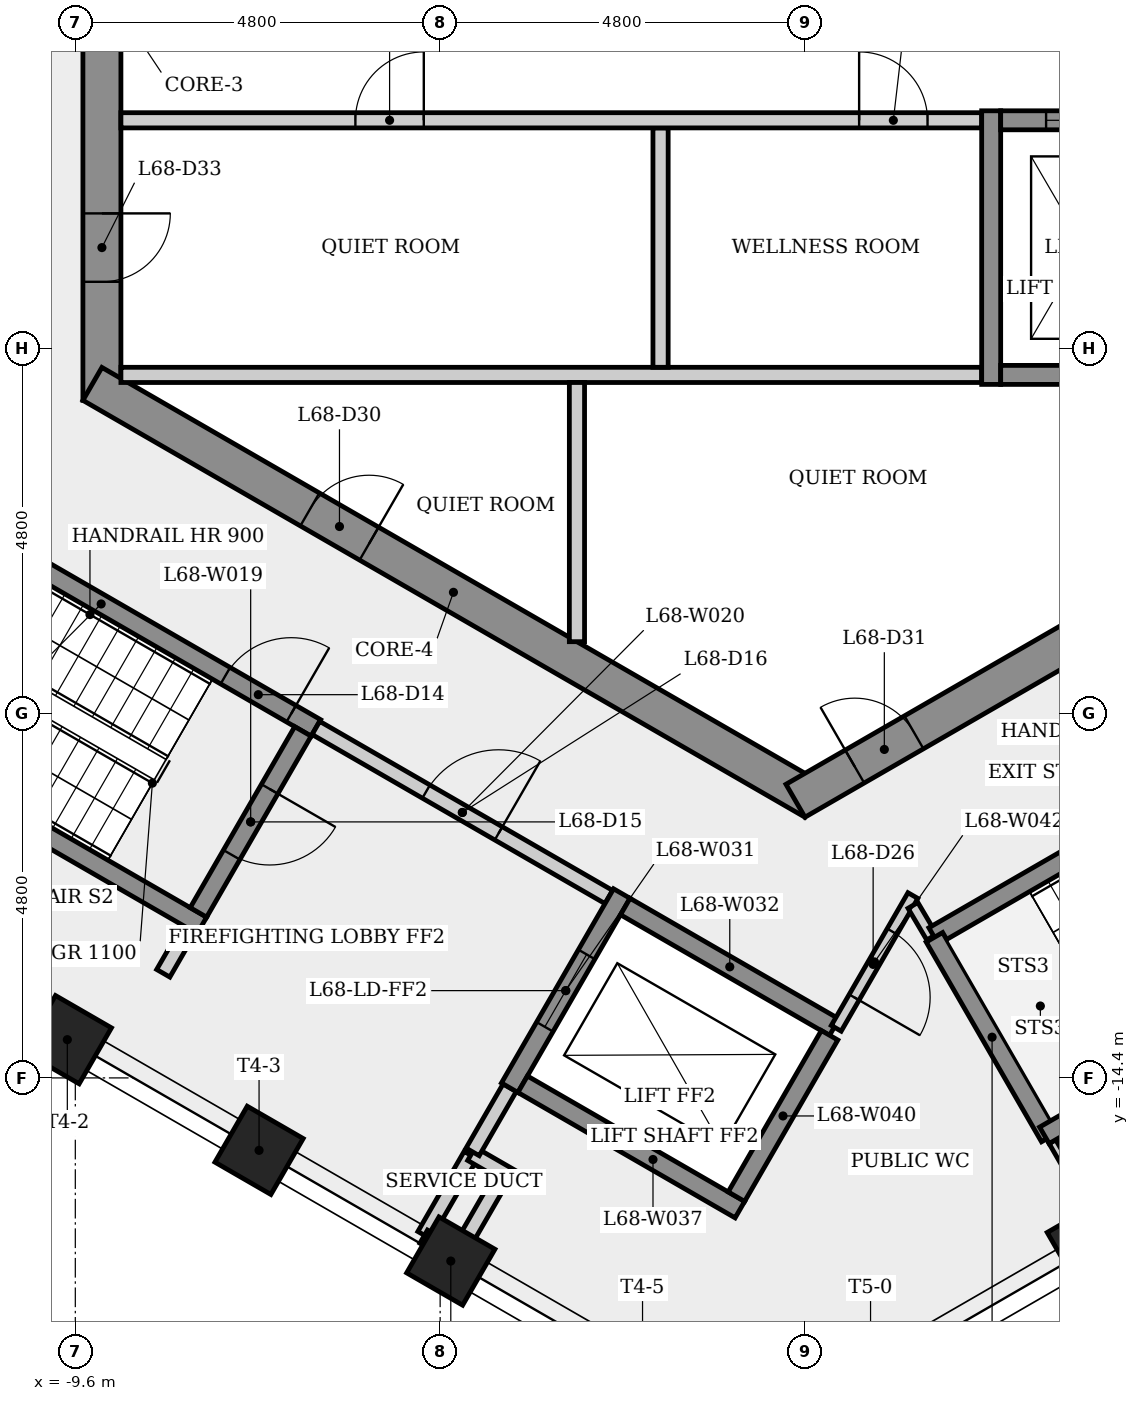
"""IFC4 building model, lengths in metres.
Left out: names, types, materials, properties, quantities, classifications, styles, units other than length and angle.
Written with IfcOpenShell. Run it as: python <this file> out.ifc"""

import sys

from ifc_helpers import new_model, si_unit, direction, frame, frame_2d, origin, origin_2d, place, context, subcontext, project, spatial, rectangle, extrude, element, fill, save


model = new_model("IFC4")
c1 = context("Model", 3, precision=1e-05, world=origin(), true_north=direction((0.0, 1.0)))
c2 = subcontext(c1, "Body", "Model", "MODEL_VIEW")
j1 = project(units=[si_unit("LENGTHUNIT", "METRE"), si_unit("PLANEANGLEUNIT", "RADIAN")], contexts=[c1])
p1 = place(None, origin())
s1 = spatial("IfcSite", under=j1, at=p1, CompositionType="ELEMENT")
p2 = place(p1, origin())
s2 = spatial("IfcBuilding", under=s1, at=p2, CompositionType="ELEMENT")
p3 = place(p2, frame((0.0, 0.0, 252.9)))
s3 = spatial("IfcBuildingStorey", under=s2, at=p3, CompositionType="ELEMENT", Elevation=252.9)
p4 = place(p3, frame((-9.25, 5.485, 0.0), z_axis=(0.0, 0.0, 1.0), x_axis=(0.0, -1.0, 0.0)))
e1 = element("IfcWall", 1, at=p4, inside=s3, PredefinedType="SHEAR", context=c2, shape_type="SweptSolid", body=[
    extrude(rectangle(XDim=10.97, YDim=0.5, at=frame_2d((5.485, 0.0))), origin(), (0.0, 0.0, 1.0), 5.0),
])
p5 = place(p4, frame((8.51, 0.0, 0.0)))
e2 = element("IfcOpeningElement", 2, at=p5, cuts=e1, PredefinedType="OPENING", context=c2, shape_type="SweptSolid", body=[
    extrude(rectangle(XDim=0.9, YDim=2.1, at=frame_2d((0.45, 1.05))), frame((0.0, 0.26, 0.0), z_axis=(0.0, -1.0, 0.0), x_axis=(1.0, 0.0, 0.0)), (0.0, 0.0, 1.0), 0.52),
])
p6 = place(p4, frame((4.685, 0.0, 0.0)))
e3 = element("IfcOpeningElement", 3, at=p6, cuts=e1, PredefinedType="OPENING", context=c2, shape_type="SweptSolid", body=[
    extrude(rectangle(XDim=1.6, YDim=2.1, at=frame_2d((0.8, 1.05))), frame((0.0, 0.26, 0.0), z_axis=(0.0, -1.0, 0.0), x_axis=(1.0, 0.0, 0.0)), (0.0, 0.0, 1.0), 0.52),
])
p7 = place(p3, frame((-9.375, -5.268, 0.0), z_axis=(0.0, 0.0, 1.0), x_axis=(0.866023993627, -0.500002442456, 0.0)))
e4 = element("IfcWall", 4, at=p7, inside=s3, PredefinedType="SHEAR", context=c2, shape_type="SweptSolid", body=[
    extrude(rectangle(XDim=10.97, YDim=0.5, at=frame_2d((5.485, 0.0))), origin(), (0.0, 0.0, 1.0), 5.0),
])
p8 = place(p7, frame((3.303, 0.0, 0.0)))
e5 = element("IfcOpeningElement", 5, at=p8, cuts=e4, PredefinedType="OPENING", context=c2, shape_type="SweptSolid", body=[
    extrude(rectangle(XDim=0.9, YDim=2.1, at=frame_2d((0.45, 1.05))), frame((0.0, 0.26, 0.0), z_axis=(0.0, -1.0, 0.0), x_axis=(1.0, 0.0, 0.0)), (0.0, 0.0, 1.0), 0.52),
])
p9 = place(p3, frame((-0.125, -10.753, 0.0), z_axis=(0.0, 0.0, 1.0), x_axis=(0.866023993627, 0.500002442456, 0.0)))
e6 = element("IfcWall", 6, at=p9, inside=s3, PredefinedType="SHEAR", context=c2, shape_type="SweptSolid", body=[
    extrude(rectangle(XDim=10.97, YDim=0.5, at=frame_2d((5.485, 0.0))), origin(), (0.0, 0.0, 1.0), 5.0),
])
p10 = place(p9, frame((0.9, 0.0, 0.0)))
e7 = element("IfcOpeningElement", 7, at=p10, cuts=e6, PredefinedType="OPENING", context=c2, shape_type="SweptSolid", body=[
    extrude(rectangle(XDim=0.9, YDim=2.1, at=frame_2d((0.45, 1.05))), frame((0.0, 0.26, 0.0), z_axis=(0.0, -1.0, 0.0), x_axis=(1.0, 0.0, 0.0)), (0.0, 0.0, 1.0), 0.52),
])
p11 = place(p9, frame((9.17, 0.0, 0.0)))
e8 = element("IfcOpeningElement", 8, at=p11, cuts=e6, PredefinedType="OPENING", context=c2, shape_type="SweptSolid", body=[
    extrude(rectangle(XDim=0.9, YDim=2.1, at=frame_2d((0.45, 1.05))), frame((0.0, 0.26, 0.0), z_axis=(0.0, -1.0, 0.0), x_axis=(1.0, 0.0, 0.0)), (0.0, 0.0, 1.0), 0.52),
])
for number, where, z_axis, x_axis in (
    (9, (-9.705, -13.897, 0.0), (0.0, 0.0, 1.0), (-0.5, -0.866, 0.0)),
    (10, (-7.182, -15.353, 0.0), (0.0, 0.0, 1.0), (-0.5, -0.866, 0.0)),
    (11, (-4.66, -16.81, 0.0), (0.0, 0.0, 1.0), (-0.5, -0.866, 0.0)),
    (12, (3.768, -16.589, 0.0), (0.0, 0.0, 1.0), (0.5, -0.866, 0.0)),
):
    element("IfcColumn", number, at=place(p3, frame(where, z_axis=z_axis, x_axis=x_axis)), inside=s3, PredefinedType="COLUMN", context=c2, shape_type="SweptSolid", body=[
        extrude(rectangle(XDim=0.85, YDim=0.85, at=origin_2d()), origin(), (0.0, 0.0, 1.0), 5.0),
    ])
p12 = place(p3, frame((-12.085, -6.532, 0.0), z_axis=(0.0, 0.0, 1.0), x_axis=(0.866031063448, -0.499990197047, 0.0)))
e13 = element("IfcWall", 13, at=p12, inside=s3, PredefinedType="SHEAR", context=c2, shape_type="SweptSolid", body=[
    extrude(rectangle(XDim=6.525, YDim=0.25, at=frame_2d((3.263, 0.0))), origin(), (0.0, 0.0, 1.0), 4.6),
])
p13 = place(p12, frame((5.15, 0.0, 0.0)))
e14 = element("IfcOpeningElement", 14, at=p13, cuts=e13, PredefinedType="OPENING", context=c2, shape_type="SweptSolid", body=[
    extrude(rectangle(XDim=1.0, YDim=2.1, at=frame_2d((0.5, 1.05))), frame((0.0, 0.135, 0.0), z_axis=(0.0, -1.0, 0.0), x_axis=(1.0, 0.0, 0.0)), (0.0, 0.0, 1.0), 0.27),
])
p14 = place(p3, frame((-9.0, -5.15, 0.0), z_axis=(0.0, 0.0, 1.0), x_axis=(1.0, 0.0, 0.0)))
e15 = element("IfcWall", 15, at=p14, inside=s3, PredefinedType="PARTITIONING", context=c2, shape_type="SweptSolid", body=[
    extrude(rectangle(XDim=11.325, YDim=0.2, at=frame_2d((5.663, 0.0))), origin(), (0.0, 0.0, 1.0), 4.6),
])
p15 = place(p3, frame((-8.443, -13.023, 0.0), z_axis=(0.0, 0.0, 1.0), x_axis=(0.500066738792, 0.865986868696, 0.0)))
e16 = element("IfcWall", 16, at=p15, inside=s3, PredefinedType="PARTITIONING", context=c2, shape_type="SweptSolid", body=[
    extrude(rectangle(XDim=0.675, YDim=0.2, at=frame_2d((0.338, 0.0))), origin(), (0.0, 0.0, 1.0), 4.6),
])
p16 = place(p3, frame((-7.935, -12.393, 0.0), z_axis=(0.0, 0.0, 1.0), x_axis=(-0.866031063448, 0.499990197047, 0.0)))
e17 = element("IfcWall", 17, at=p16, inside=s3, PredefinedType="SHEAR", context=c2, shape_type="SweptSolid", body=[
    extrude(rectangle(XDim=6.525, YDim=0.25, at=frame_2d((3.263, 0.0))), origin(), (0.0, 0.0, 1.0), 4.6),
])
p17 = place(p3, frame((-6.605, -9.841, 0.0), z_axis=(0.0, 0.0, 1.0), x_axis=(-0.499996545922, -0.866027397988, 0.0)))
e18 = element("IfcWall", 18, at=p17, inside=s3, PredefinedType="SHEAR", context=c2, shape_type="SweptSolid", body=[
    extrude(rectangle(XDim=2.75, YDim=0.25, at=frame_2d((1.375, 0.0))), origin(), (0.0, 0.0, 1.0), 4.6),
])
p18 = place(p17, frame((0.875, 0.0, 0.0)))
e19 = element("IfcOpeningElement", 19, at=p18, cuts=e18, PredefinedType="OPENING", context=c2, shape_type="SweptSolid", body=[
    extrude(rectangle(XDim=1.0, YDim=2.1, at=frame_2d((0.5, 1.05))), frame((0.0, 0.135, 0.0), z_axis=(0.0, -1.0, 0.0), x_axis=(1.0, 0.0, 0.0)), (0.0, 0.0, 1.0), 0.27),
])
p19 = place(p3, frame((-6.435, -9.795, 0.0), z_axis=(0.0, 0.0, 1.0), x_axis=(0.866012907634, -0.500021643343, 0.0)))
e20 = element("IfcWall", 20, at=p19, inside=s3, PredefinedType="PARTITIONING", context=c2, shape_type="SweptSolid", body=[
    extrude(rectangle(XDim=4.45, YDim=0.2, at=frame_2d((2.225, 0.0))), origin(), (0.0, 0.0, 1.0), 4.6),
])
p20 = place(p19, frame((1.675, 0.0, 0.0)))
e21 = element("IfcOpeningElement", 21, at=p20, cuts=e20, PredefinedType="OPENING", context=c2, shape_type="SweptSolid", body=[
    extrude(rectangle(XDim=1.1, YDim=2.1, at=frame_2d((0.55, 1.05))), frame((0.0, 0.11, 0.0), z_axis=(0.0, -1.0, 0.0), x_axis=(1.0, 0.0, 0.0)), (0.0, 0.0, 1.0), 0.22),
])
p21 = place(p3, frame((-5.006, -16.471, 0.0), z_axis=(0.0, 0.0, 1.0), x_axis=(0.499913398087, 0.866075397649, 0.0)))
e22 = element("IfcWall", 22, at=p21, inside=s3, PredefinedType="PLUMBINGWALL", context=c2, shape_type="SweptSolid", body=[
    extrude(rectangle(XDim=1.218, YDim=0.2, at=frame_2d((0.609, 0.0))), origin(), (0.0, 0.0, 1.0), 4.6),
])
for number, where, z_axis, x_axis in (
    (23, (-4.497, -16.788, 0.0), (0.0, 0.0, 1.0), (-0.866, 0.5, 0.0)),
    (24, (-4.387, -15.399, 0.0), (0.0, 0.0, 1.0), (0.866, -0.5, 0.0)),
):
    element("IfcWall", number, at=place(p3, frame(where, z_axis=z_axis, x_axis=x_axis)), inside=s3, PredefinedType="PLUMBINGWALL", context=c2, shape_type="SweptSolid", body=[
        extrude(rectangle(XDim=0.6, YDim=0.2, at=frame_2d((0.3, 0.0))), origin(), (0.0, 0.0, 1.0), 4.6),
    ])
p22 = place(p3, frame((-4.004, -15.736, 0.0), z_axis=(0.0, 0.0, 1.0), x_axis=(-0.500062184469, -0.865989498588, 0.0)))
e25 = element("IfcWall", 25, at=p22, inside=s3, PredefinedType="PLUMBINGWALL", context=c2, shape_type="SweptSolid", body=[
    extrude(rectangle(XDim=1.057, YDim=0.2, at=frame_2d((0.529, 0.0))), origin(), (0.0, 0.0, 1.0), 4.6),
])
p23 = place(p3, frame((-3.885, -14.529, 0.0), z_axis=(0.0, 0.0, 1.0), x_axis=(-0.49998975084, -0.866031321059, 0.0)))
e26 = element("IfcWall", 26, at=p23, inside=s3, PredefinedType="PARTITIONING", context=c2, shape_type="SweptSolid", body=[
    extrude(rectangle(XDim=0.975, YDim=0.2, at=frame_2d((0.488, 0.0))), origin(), (0.0, 0.0, 1.0), 4.6),
])
p24 = place(p3, frame((-3.0, -5.25, 0.0), z_axis=(0.0, 0.0, 1.0), x_axis=(0.0, -1.0, 0.0)))
e27 = element("IfcWall", 27, at=p24, inside=s3, PredefinedType="PARTITIONING", context=c2, shape_type="SweptSolid", body=[
    extrude(rectangle(XDim=3.41, YDim=0.2, at=frame_2d((1.705, 0.0))), origin(), (0.0, 0.0, 1.0), 4.6),
])
p25 = place(p3, frame((-2.41, -11.974, 0.0), z_axis=(0.0, 0.0, 1.0), x_axis=(-0.500001826776, -0.866024349092, 0.0)))
e28 = element("IfcWall", 28, at=p25, inside=s3, PredefinedType="SHEAR", context=c2, shape_type="SweptSolid", body=[
    extrude(rectangle(XDim=2.95, YDim=0.25, at=frame_2d((1.475, 0.0))), origin(), (0.0, 0.0, 1.0), 4.6),
])
p26 = place(p25, frame((0.925, 0.0, 0.0)))
e29 = element("IfcOpeningElement", 29, at=p26, cuts=e28, PredefinedType="OPENING", context=c2, shape_type="SweptSolid", body=[
    extrude(rectangle(XDim=1.1, YDim=2.1, at=frame_2d((0.55, 1.05))), frame((0.0, 0.135, 0.0), z_axis=(0.0, -1.0, 0.0), x_axis=(1.0, 0.0, 0.0)), (0.0, 0.0, 1.0), 0.27),
])
p27 = place(p3, frame((-2.364, -12.145, 0.0), z_axis=(0.0, 0.0, 1.0), x_axis=(0.866048579423, -0.499959856469, 0.0)))
e30 = element("IfcWall", 30, at=p27, inside=s3, PredefinedType="SHEAR", context=c2, shape_type="SweptSolid", body=[
    extrude(rectangle(XDim=3.175, YDim=0.25, at=frame_2d((1.587, 0.0))), origin(), (0.0, 0.0, 1.0), 5.0),
])
p28 = place(p3, frame((-1.9, -1.9, 0.0), z_axis=(0.0, 0.0, 1.0), x_axis=(0.0, -1.0, 0.0)))
e31 = element("IfcWall", 31, at=p28, inside=s3, PredefinedType="PARTITIONING", context=c2, shape_type="SweptSolid", body=[
    extrude(rectangle(XDim=3.15, YDim=0.2, at=frame_2d((1.575, 0.0))), origin(), (0.0, 0.0, 1.0), 4.6),
])
p29 = place(p3, frame((-9.0, -1.8, 0.0), z_axis=(0.0, 0.0, 1.0), x_axis=(1.0, 0.0, 0.0)))
e32 = element("IfcWall", 32, at=p29, inside=s3, PredefinedType="PARTITIONING", context=c2, shape_type="SweptSolid", body=[
    extrude(rectangle(XDim=11.325, YDim=0.2, at=frame_2d((5.663, 0.0))), origin(), (0.0, 0.0, 1.0), 4.6),
])
p30 = place(p29, frame((3.085, 0.0, 0.0)))
e33 = element("IfcOpeningElement", 33, at=p30, cuts=e32, PredefinedType="OPENING", context=c2, shape_type="SweptSolid", body=[
    extrude(rectangle(XDim=0.9, YDim=2.1, at=frame_2d((0.45, 1.05))), frame((0.0, 0.11, 0.0), z_axis=(0.0, -1.0, 0.0), x_axis=(1.0, 0.0, 0.0)), (0.0, 0.0, 1.0), 0.22),
])
p31 = place(p29, frame((9.713, 0.0, 0.0)))
e34 = element("IfcOpeningElement", 34, at=p31, cuts=e32, PredefinedType="OPENING", context=c2, shape_type="SweptSolid", body=[
    extrude(rectangle(XDim=0.9, YDim=2.1, at=frame_2d((0.45, 1.05))), frame((0.0, 0.11, 0.0), z_axis=(0.0, -1.0, 0.0), x_axis=(1.0, 0.0, 0.0)), (0.0, 0.0, 1.0), 0.22),
])
p32 = place(p3, frame((-0.856, -16.133, 0.0), z_axis=(0.0, 0.0, 1.0), x_axis=(-0.866021716278, 0.500006386895, 0.0)))
e35 = element("IfcWall", 35, at=p32, inside=s3, PredefinedType="SHEAR", context=c2, shape_type="SweptSolid", body=[
    extrude(rectangle(XDim=3.3, YDim=0.25, at=frame_2d((1.65, 0.0))), origin(), (0.0, 0.0, 1.0), 4.6),
])
p33 = place(p3, frame((0.324, -13.839, 0.0), z_axis=(0.0, 0.0, 1.0), x_axis=(-0.500015484165, -0.866016463813, 0.0)))
e36 = element("IfcWall", 36, at=p33, inside=s3, PredefinedType="SHEAR", context=c2, shape_type="SweptSolid", body=[
    extrude(rectangle(XDim=2.452, YDim=0.25, at=frame_2d((1.226, 0.0))), origin(), (0.0, 0.0, 1.0), 5.0),
])
p34 = place(p3, frame((1.42, -12.0, 0.0), z_axis=(0.0, 0.0, 1.0), x_axis=(-0.499952933402, -0.866052575992, 0.0)))
e37 = element("IfcWall", 37, at=p34, inside=s3, PredefinedType="PARTITIONING", context=c2, shape_type="SweptSolid", body=[
    extrude(rectangle(XDim=2.017, YDim=0.15, at=frame_2d((1.009, 0.0))), origin(), (0.0, 0.0, 1.0), 4.6),
])
p35 = place(p34, frame((0.546, 0.0, 0.0)))
e38 = element("IfcOpeningElement", 38, at=p35, cuts=e37, PredefinedType="OPENING", context=c2, shape_type="SweptSolid", body=[
    extrude(rectangle(XDim=1.0, YDim=2.1, at=frame_2d((0.5, 1.05))), frame((0.0, 0.085, 0.0), z_axis=(0.0, -1.0, 0.0), x_axis=(1.0, 0.0, 0.0)), (0.0, 0.0, 1.0), 0.17),
])
p36 = place(p3, frame((1.667, -12.548, 0.0), z_axis=(0.0, 0.0, 1.0), x_axis=(-0.508186221736, 0.861247214241, 0.0)))
e39 = element("IfcWall", 39, at=p36, inside=s3, PredefinedType="PARTITIONING", context=c2, shape_type="SweptSolid", body=[
    extrude(rectangle(XDim=0.485, YDim=0.15, at=frame_2d((0.242, 0.0))), origin(), (0.0, 0.0, 1.0), 4.6),
])
p37 = place(p3, frame((1.693, -12.532, 0.0), z_axis=(0.0, 0.0, 1.0), x_axis=(0.866031063448, 0.499990197047, 0.0)))
e40 = element("IfcWall", 40, at=p37, inside=s3, PredefinedType="SHEAR", context=c2, shape_type="SweptSolid", body=[
    extrude(rectangle(XDim=6.525, YDim=0.25, at=frame_2d((3.263, 0.0))), origin(), (0.0, 0.0, 1.0), 4.6),
])
p38 = place(p37, frame((5.15, 0.0, 0.0)))
e41 = element("IfcOpeningElement", 41, at=p38, cuts=e40, PredefinedType="OPENING", context=c2, shape_type="SweptSolid", body=[
    extrude(rectangle(XDim=1.0, YDim=2.1, at=frame_2d((0.5, 1.05))), frame((0.0, 0.135, 0.0), z_axis=(0.0, -1.0, 0.0), x_axis=(1.0, 0.0, 0.0)), (0.0, 0.0, 1.0), 0.27),
])
p39 = place(p3, frame((2.45, -5.275, 0.0), z_axis=(0.0, 0.0, 1.0), x_axis=(0.0, 1.0, 0.0)))
e42 = element("IfcWall", 42, at=p39, inside=s3, PredefinedType="SHEAR", context=c2, shape_type="SweptSolid", body=[
    extrude(rectangle(XDim=3.6, YDim=0.25, at=frame_2d((1.8, 0.0))), origin(), (0.0, 0.0, 1.0), 4.6),
])
p40 = place(p3, frame((3.221, -15.178, 0.0), z_axis=(0.0, 0.0, 1.0), x_axis=(-0.500014901547, 0.866016800201, 0.0)))
e43 = element("IfcWall", 43, at=p40, inside=s3, PredefinedType="SHEAR", context=c2, shape_type="SweptSolid", body=[
    extrude(rectangle(XDim=3.035, YDim=0.25, at=frame_2d((1.518, 0.0))), origin(), (0.0, 0.0, 1.0), 4.6),
])
p41 = place(p3, frame((3.99, -16.511, 0.0), z_axis=(0.0, 0.0, 1.0), x_axis=(-0.499928667132, 0.866066583918, 0.0)))
e44 = element("IfcWall", 44, at=p41, inside=s3, PredefinedType="PARTITIONING", context=c2, shape_type="SweptSolid", body=[
    extrude(rectangle(XDim=1.469, YDim=0.1, at=frame_2d((0.734, 0.0))), origin(), (0.0, 0.0, 1.0), 4.6),
])
p42 = place(p3, frame((2.575, -5.15, 0.0), z_axis=(0.0, 0.0, 1.0), x_axis=(1.0, 0.0, 0.0)))
e45 = element("IfcWall", 45, at=p42, inside=s3, PredefinedType="SHEAR", context=c2, shape_type="SweptSolid", body=[
    extrude(rectangle(XDim=4.9, YDim=0.25, at=frame_2d((2.45, 0.0))), origin(), (0.0, 0.0, 1.0), 4.6),
])
p43 = place(p3, frame((2.575, -1.8, 0.0), z_axis=(0.0, 0.0, 1.0), x_axis=(1.0, 0.0, 0.0)))
e46 = element("IfcWall", 46, at=p43, inside=s3, PredefinedType="SHEAR", context=c2, shape_type="SweptSolid", body=[
    extrude(rectangle(XDim=4.9, YDim=0.25, at=frame_2d((2.45, 0.0))), origin(), (0.0, 0.0, 1.0), 4.6),
])
p44 = place(p43, frame((0.597, 0.0, 0.0)))
e47 = element("IfcOpeningElement", 47, at=p44, cuts=e46, PredefinedType="OPENING", context=c2, shape_type="SweptSolid", body=[
    extrude(rectangle(XDim=1.1, YDim=2.1, at=frame_2d((0.55, 1.05))), frame((0.0, 0.135, 0.0), z_axis=(0.0, -1.0, 0.0), x_axis=(1.0, 0.0, 0.0)), (0.0, 0.0, 1.0), 0.27),
])
p45 = place(p3, frame((8.627, -11.993, 0.0), z_axis=(0.0, 0.0, 1.0), x_axis=(-0.866032601554, -0.49998753289, 0.0)))
e48 = element("IfcWall", 48, at=p45, inside=s3, PredefinedType="SHEAR", context=c2, shape_type="SweptSolid", body=[
    extrude(rectangle(XDim=6.325, YDim=0.25, at=frame_2d((3.163, 0.0))), origin(), (0.0, 0.0, 1.0), 4.6),
])
p46 = place(p44, origin())
e49 = element("IfcDoor", 49, at=p46, inside=s3, OperationType="SLIDING_TO_LEFT", PredefinedType="DOOR", context=c2, shape_type="SweptSolid", body=[
    extrude(rectangle(XDim=1.1, YDim=2.1, at=frame_2d((0.55, 1.05))), frame((0.0, 0.025, 0.0), z_axis=(0.0, -1.0, 0.0), x_axis=(1.0, 0.0, 0.0)), (0.0, 0.0, 1.0), 0.05),
])
fill(e47, e49)
p47 = place(p30, origin())
e50 = element("IfcDoor", 50, at=p47, inside=s3, OperationType="SINGLE_SWING_RIGHT", PredefinedType="DOOR", context=c2, shape_type="SweptSolid", body=[
    extrude(rectangle(XDim=0.9, YDim=2.1, at=frame_2d((0.45, 1.05))), frame((0.0, 0.025, 0.0), z_axis=(0.0, -1.0, 0.0), x_axis=(1.0, 0.0, 0.0)), (0.0, 0.0, 1.0), 0.05),
])
fill(e33, e50)
p48 = place(p31, origin())
e51 = element("IfcDoor", 51, at=p48, inside=s3, OperationType="SINGLE_SWING_LEFT", PredefinedType="DOOR", context=c2, shape_type="SweptSolid", body=[
    extrude(rectangle(XDim=0.9, YDim=2.1, at=frame_2d((0.45, 1.05))), frame((0.0, 0.025, 0.0), z_axis=(0.0, -1.0, 0.0), x_axis=(1.0, 0.0, 0.0)), (0.0, 0.0, 1.0), 0.05),
])
fill(e34, e51)
p49 = place(p13, origin())
e52 = element("IfcDoor", 52, at=p49, inside=s3, OperationType="SINGLE_SWING_RIGHT", PredefinedType="DOOR", context=c2, shape_type="SweptSolid", body=[
    extrude(rectangle(XDim=1.0, YDim=2.1, at=frame_2d((0.5, 1.05))), frame((0.0, 0.025, 0.0), z_axis=(0.0, -1.0, 0.0), x_axis=(1.0, 0.0, 0.0)), (0.0, 0.0, 1.0), 0.05),
])
fill(e14, e52)
p50 = place(p18, origin())
e53 = element("IfcDoor", 53, at=p50, inside=s3, OperationType="SINGLE_SWING_LEFT", PredefinedType="DOOR", context=c2, shape_type="SweptSolid", body=[
    extrude(rectangle(XDim=1.0, YDim=2.1, at=frame_2d((0.5, 1.05))), frame((0.0, 0.025, 0.0), z_axis=(0.0, -1.0, 0.0), x_axis=(1.0, 0.0, 0.0)), (0.0, 0.0, 1.0), 0.05),
])
fill(e19, e53)
p51 = place(p20, origin())
e54 = element("IfcDoor", 54, at=p51, inside=s3, OperationType="SINGLE_SWING_RIGHT", PredefinedType="DOOR", context=c2, shape_type="SweptSolid", body=[
    extrude(rectangle(XDim=1.1, YDim=2.1, at=frame_2d((0.55, 1.05))), frame((0.0, 0.025, 0.0), z_axis=(0.0, -1.0, 0.0), x_axis=(1.0, 0.0, 0.0)), (0.0, 0.0, 1.0), 0.05),
])
fill(e21, e54)
p52 = place(p26, origin())
e55 = element("IfcDoor", 55, at=p52, inside=s3, OperationType="SLIDING_TO_LEFT", PredefinedType="DOOR", context=c2, shape_type="SweptSolid", body=[
    extrude(rectangle(XDim=1.1, YDim=2.1, at=frame_2d((0.55, 1.05))), frame((0.0, 0.025, 0.0), z_axis=(0.0, -1.0, 0.0), x_axis=(1.0, 0.0, 0.0)), (0.0, 0.0, 1.0), 0.05),
])
fill(e29, e55)
p53 = place(p35, origin())
e56 = element("IfcDoor", 56, at=p53, inside=s3, OperationType="SINGLE_SWING_RIGHT", PredefinedType="DOOR", context=c2, shape_type="SweptSolid", body=[
    extrude(rectangle(XDim=1.0, YDim=2.1, at=frame_2d((0.5, 1.05))), frame((0.0, 0.025, 0.0), z_axis=(0.0, -1.0, 0.0), x_axis=(1.0, 0.0, 0.0)), (0.0, 0.0, 1.0), 0.05),
])
fill(e38, e56)
p54 = place(p8, origin())
e57 = element("IfcDoor", 57, at=p54, inside=s3, OperationType="SINGLE_SWING_RIGHT", PredefinedType="DOOR", context=c2, shape_type="SweptSolid", body=[
    extrude(rectangle(XDim=0.9, YDim=2.1, at=frame_2d((0.45, 1.05))), frame((0.0, 0.025, 0.0), z_axis=(0.0, -1.0, 0.0), x_axis=(1.0, 0.0, 0.0)), (0.0, 0.0, 1.0), 0.05),
])
fill(e5, e57)
p55 = place(p10, origin())
e58 = element("IfcDoor", 58, at=p55, inside=s3, OperationType="SINGLE_SWING_LEFT", PredefinedType="DOOR", context=c2, shape_type="SweptSolid", body=[
    extrude(rectangle(XDim=0.9, YDim=2.1, at=frame_2d((0.45, 1.05))), frame((0.0, 0.025, 0.0), z_axis=(0.0, -1.0, 0.0), x_axis=(1.0, 0.0, 0.0)), (0.0, 0.0, 1.0), 0.05),
])
fill(e7, e58)
p56 = place(p5, origin())
e59 = element("IfcDoor", 59, at=p56, inside=s3, OperationType="SINGLE_SWING_LEFT", PredefinedType="DOOR", context=c2, shape_type="SweptSolid", body=[
    extrude(rectangle(XDim=0.9, YDim=2.1, at=frame_2d((0.45, 1.05))), frame((0.0, 0.025, 0.0), z_axis=(0.0, -1.0, 0.0), x_axis=(1.0, 0.0, 0.0)), (0.0, 0.0, 1.0), 0.05),
])
fill(e2, e59)
save(model, sys.argv[1])
